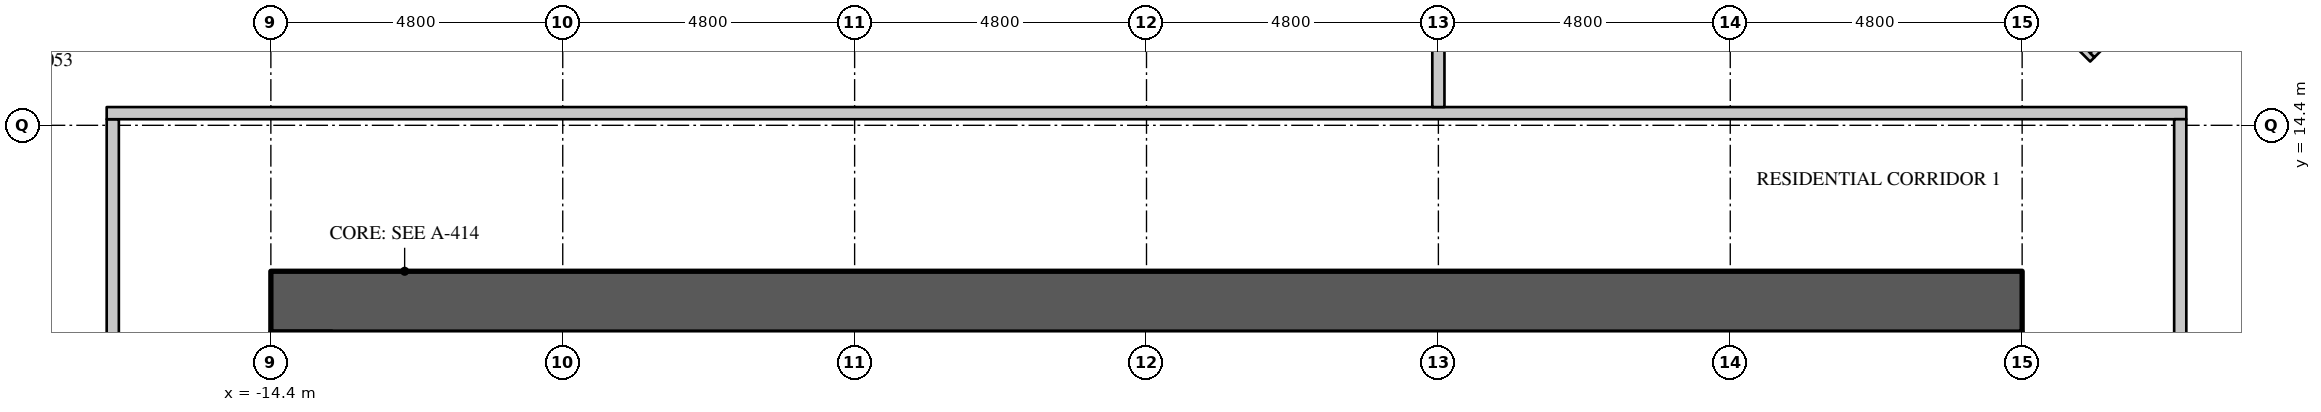
"""IFC4 building model, lengths in metres.
Left out: names, types, materials, properties, quantities, classifications, styles, units other than length and angle.
Written with IfcOpenShell. Run it as: python <this file> out.ifc"""

import sys

from ifc_helpers import new_model, si_unit, direction, frame, frame_2d, origin, place, context, subcontext, project, spatial, rectangle, extrude, element, save


model = new_model("IFC4")
c1 = context("Model", 3, precision=1e-05, world=origin(), true_north=direction((0.0, 1.0)))
c2 = subcontext(c1, "Body", "Model", "MODEL_VIEW")
j1 = project(units=[si_unit("LENGTHUNIT", "METRE"), si_unit("PLANEANGLEUNIT", "RADIAN")], contexts=[c1])
p1 = place(None, origin())
s1 = spatial("IfcSite", under=j1, at=p1, CompositionType="ELEMENT")
p2 = place(p1, origin())
s2 = spatial("IfcBuilding", under=s1, at=p2, CompositionType="ELEMENT")
p3 = place(p2, frame((0.0, 0.0, 92.7)))
s3 = spatial("IfcBuildingStorey", under=s2, at=p3, CompositionType="ELEMENT", Elevation=92.7)
p4 = place(p3, frame((-14.4, 11.5, 0.0), z_axis=(0.0, 0.0, 1.0), x_axis=(1.0, 0.0, 0.0)))
e1 = element("IfcWall", 1, at=p4, inside=s3, PredefinedType="SHEAR", context=c2, shape_type="SweptSolid", body=[
    extrude(rectangle(XDim=28.8, YDim=1.0, at=frame_2d((14.4, 0.0))), origin(), (0.0, 0.0, 1.0), 4.2),
])
p5 = place(p3, frame((-17.0, -14.5, 0.0), z_axis=(0.0, 0.0, 1.0), x_axis=(0.0, 1.0, 0.0)))
e2 = element("IfcWall", 2, at=p5, inside=s3, PredefinedType="PARTITIONING", context=c2, shape_type="SweptSolid", body=[
    extrude(rectangle(XDim=29.0, YDim=0.2, at=frame_2d((14.5, 0.0))), origin(), (0.0, 0.0, 1.0), 3.798),
])
p6 = place(p5, frame((11.55, 0.0, 0.0)))
e3 = element("IfcOpeningElement", 3, at=p6, cuts=e2, PredefinedType="OPENING", context=c2, shape_type="SweptSolid", body=[
    extrude(rectangle(XDim=1.1, YDim=2.4, at=frame_2d((0.55, 1.2))), frame((0.0, 0.11, 0.0), z_axis=(0.0, -1.0, 0.0), x_axis=(1.0, 0.0, 0.0)), (0.0, 0.0, 1.0), 0.22),
])
p7 = place(p3, frame((-17.1, 14.6, 0.0), z_axis=(0.0, 0.0, 1.0), x_axis=(1.0, 0.0, 0.0)))
e4 = element("IfcWall", 4, at=p7, inside=s3, PredefinedType="PARTITIONING", context=c2, shape_type="SweptSolid", body=[
    extrude(rectangle(XDim=34.2, YDim=0.2, at=frame_2d((17.1, 0.0))), origin(), (0.0, 0.0, 1.0), 3.798),
])
p8 = place(p3, frame((17.0, -14.5, 0.0), z_axis=(0.0, 0.0, 1.0), x_axis=(0.0, 1.0, 0.0)))
e5 = element("IfcWall", 5, at=p8, inside=s3, PredefinedType="PARTITIONING", context=c2, shape_type="SweptSolid", body=[
    extrude(rectangle(XDim=29.0, YDim=0.2, at=frame_2d((14.5, 0.0))), origin(), (0.0, 0.0, 1.0), 3.798),
])
p9 = place(p8, frame((15.9, 0.0, 0.0)))
e6 = element("IfcOpeningElement", 6, at=p9, cuts=e5, PredefinedType="OPENING", context=c2, shape_type="SweptSolid", body=[
    extrude(rectangle(XDim=1.1, YDim=2.4, at=frame_2d((0.55, 1.2))), frame((0.0, 0.11, 0.0), z_axis=(0.0, -1.0, 0.0), x_axis=(1.0, 0.0, 0.0)), (0.0, 0.0, 1.0), 0.22),
])
p10 = place(p3, frame((-22.747, 11.968, 0.0), z_axis=(0.0, 0.0, 1.0), x_axis=(0.707106781187, 0.707106781187, 0.0)))
e7 = element("IfcWall", 7, at=p10, inside=s3, PredefinedType="PARTITIONING", context=c2, shape_type="SweptSolid", body=[
    extrude(rectangle(XDim=9.913, YDim=0.15, at=frame_2d((4.957, 0.0))), origin(), (0.0, 0.0, 1.0), 3.798),
])
p11 = place(p10, frame((4.45, 0.0, 0.0)))
e8 = element("IfcOpeningElement", 8, at=p11, cuts=e7, PredefinedType="OPENING", context=c2, shape_type="SweptSolid", body=[
    extrude(rectangle(XDim=0.95, YDim=2.2, at=frame_2d((0.475, 1.1))), frame((0.0, 0.085, 0.0), z_axis=(0.0, -1.0, 0.0), x_axis=(1.0, 0.0, 0.0)), (0.0, 0.0, 1.0), 0.17),
])
p12 = place(p10, frame((8.35, 0.0, 0.0)))
e9 = element("IfcOpeningElement", 9, at=p12, cuts=e7, PredefinedType="OPENING", context=c2, shape_type="SweptSolid", body=[
    extrude(rectangle(XDim=0.95, YDim=2.2, at=frame_2d((0.475, 1.1))), frame((0.0, 0.085, 0.0), z_axis=(0.0, -1.0, 0.0), x_axis=(1.0, 0.0, 0.0)), (0.0, 0.0, 1.0), 0.17),
])
p13 = place(p3, frame((17.64, 17.64, 0.0), z_axis=(0.0, 0.0, 1.0), x_axis=(0.707106781187, -0.707106781187, 0.0)))
e10 = element("IfcWall", 10, at=p13, inside=s3, PredefinedType="PARTITIONING", context=c2, shape_type="SweptSolid", body=[
    extrude(rectangle(XDim=7.938, YDim=0.15, at=frame_2d((3.969, 0.0))), origin(), (0.0, 0.0, 1.0), 3.798),
])
p14 = place(p13, frame((6.8, 0.0, 0.0)))
e11 = element("IfcOpeningElement", 11, at=p14, cuts=e10, PredefinedType="OPENING", context=c2, shape_type="SweptSolid", body=[
    extrude(rectangle(XDim=0.95, YDim=2.2, at=frame_2d((0.475, 1.1))), frame((0.0, 0.085, 0.0), z_axis=(0.0, -1.0, 0.0), x_axis=(1.0, 0.0, 0.0)), (0.0, 0.0, 1.0), 0.17),
])
p15 = place(p13, frame((2.1, 0.0, 0.0)))
e12 = element("IfcOpeningElement", 12, at=p15, cuts=e10, PredefinedType="OPENING", context=c2, shape_type="SweptSolid", body=[
    extrude(rectangle(XDim=0.95, YDim=2.2, at=frame_2d((0.475, 1.1))), frame((0.0, 0.085, 0.0), z_axis=(0.0, -1.0, 0.0), x_axis=(1.0, 0.0, 0.0)), (0.0, 0.0, 1.0), 0.17),
])
p16 = place(p3, frame((4.8, 14.7, 0.0), z_axis=(0.0, 0.0, 1.0), x_axis=(0.0, 1.0, 0.0)))
e13 = element("IfcWall", 13, at=p16, inside=s3, PredefinedType="PARTITIONING", context=c2, shape_type="SweptSolid", body=[
    extrude(rectangle(XDim=13.2, YDim=0.2, at=frame_2d((6.6, 0.0))), origin(), (0.0, 0.0, 1.0), 3.1),
])
p17 = place(p3, frame((13.504, 17.534, 0.0), z_axis=(0.0, 0.0, 1.0), x_axis=(0.707106781187, -0.707106781187, 0.0)))
e14 = element("IfcWall", 14, at=p17, inside=s3, PredefinedType="PARTITIONING", context=c2, shape_type="SweptSolid", body=[
    extrude(rectangle(XDim=2.9, YDim=0.1, at=frame_2d((1.45, 0.0))), origin(), (0.0, 0.0, 1.0), 3.798),
])
p18 = place(p3, frame((15.554, 15.554, 0.0), z_axis=(0.0, 0.0, 1.0), x_axis=(0.707106781187, 0.707106781187, 0.0)))
e15 = element("IfcWall", 15, at=p18, inside=s3, PredefinedType="PARTITIONING", context=c2, shape_type="SweptSolid", body=[
    extrude(rectangle(XDim=2.93, YDim=0.1, at=frame_2d((1.465, 0.0))), origin(), (0.0, 0.0, 1.0), 3.798),
])
save(model, sys.argv[1])
